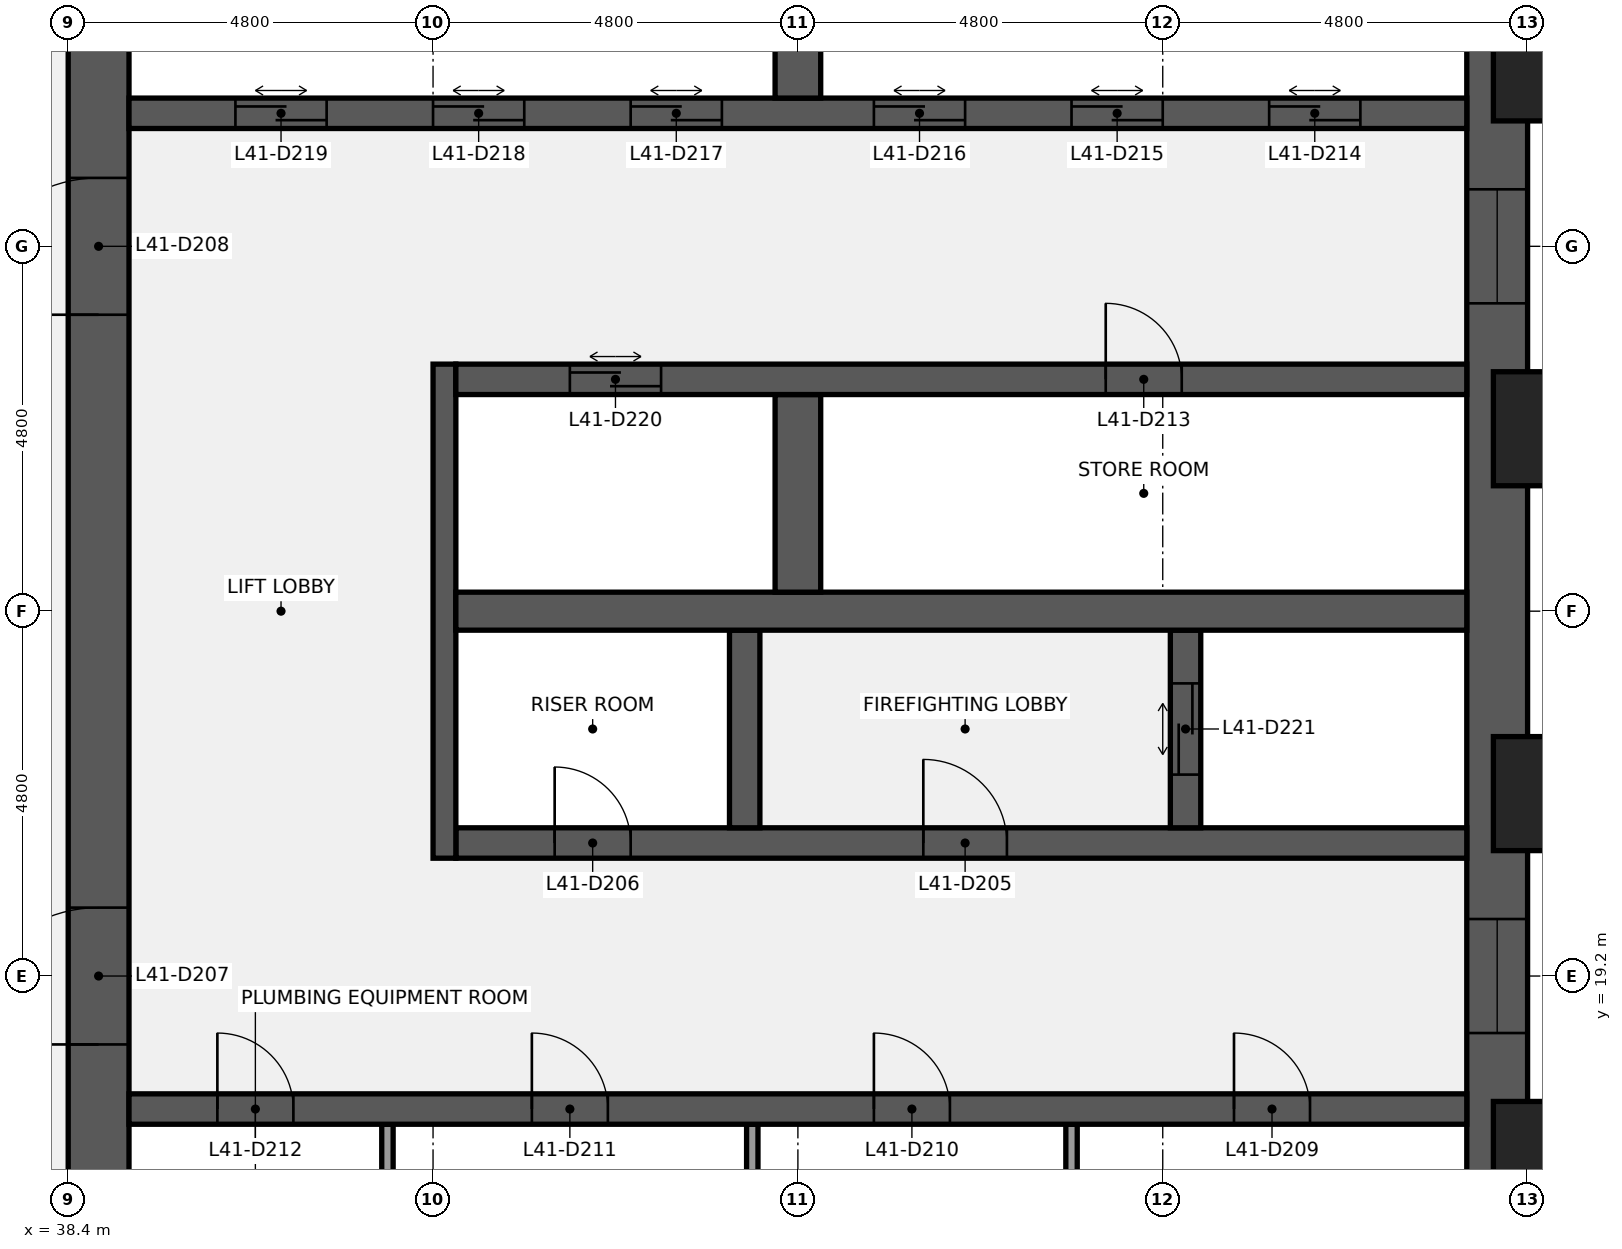
"""IFC4 building model, lengths in metres.
Left out: names, types, materials, properties, quantities, classifications, styles, units other than length and angle.
Written with IfcOpenShell. Run it as: python <this file> out.ifc"""

import sys

from ifc_helpers import new_model, si_unit, direction, frame, frame_2d, origin, origin_2d, place, context, subcontext, project, spatial, rectangle, extrude, element, fill, save


model = new_model("IFC4")
c1 = context("Model", 3, precision=1e-05, world=origin(), true_north=direction((0.0, 1.0)))
c2 = subcontext(c1, "Body", "Model", "MODEL_VIEW")
j1 = project(units=[si_unit("LENGTHUNIT", "METRE"), si_unit("PLANEANGLEUNIT", "RADIAN")], contexts=[c1])
p1 = place(None, origin())
s1 = spatial("IfcSite", under=j1, at=p1, CompositionType="ELEMENT")
p2 = place(p1, origin())
s2 = spatial("IfcBuilding", under=s1, at=p2, CompositionType="ELEMENT")
p3 = place(p2, frame((0.0, 0.0, 193.2)))
s3 = spatial("IfcBuildingStorey", under=s2, at=p3, CompositionType="ELEMENT", Elevation=193.2)
p4 = place(p3, frame((57.2, 38.4, 0.0), z_axis=(0.0, 0.0, 1.0), x_axis=(0.0, -1.0, 0.0)))
e1 = element("IfcWall", 1, at=p4, inside=s3, PredefinedType="SHEAR", context=c2, shape_type="SweptSolid", body=[
    extrude(rectangle(XDim=28.8, YDim=0.8, at=frame_2d((14.4, 0.0))), origin(), (0.0, 0.0, 1.0), 3.84),
])
p5 = place(p4, frame((18.45, 0.0, 0.9)))
e2 = element("IfcOpeningElement", 2, at=p5, cuts=e1, PredefinedType="OPENING", context=c2, shape_type="SweptSolid", body=[
    extrude(rectangle(XDim=1.5, YDim=1.5, at=frame_2d((0.75, 0.75))), frame((0.0, 0.41, 0.0), z_axis=(0.0, -1.0, 0.0), x_axis=(1.0, 0.0, 0.0)), (0.0, 0.0, 1.0), 0.82),
])
p6 = place(p4, frame((8.85, 0.0, 0.9)))
e3 = element("IfcOpeningElement", 3, at=p6, cuts=e1, PredefinedType="OPENING", context=c2, shape_type="SweptSolid", body=[
    extrude(rectangle(XDim=1.5, YDim=1.5, at=frame_2d((0.75, 0.75))), frame((0.0, 0.41, 0.0), z_axis=(0.0, -1.0, 0.0), x_axis=(1.0, 0.0, 0.0)), (0.0, 0.0, 1.0), 0.82),
])
p7 = place(p3, frame((38.8, 9.6, 0.0), z_axis=(0.0, 0.0, 1.0), x_axis=(0.0, 1.0, 0.0)))
e4 = element("IfcWall", 4, at=p7, inside=s3, PredefinedType="SHEAR", context=c2, shape_type="SweptSolid", body=[
    extrude(rectangle(XDim=28.8, YDim=0.8, at=frame_2d((14.4, 0.0))), origin(), (0.0, 0.0, 1.0), 3.84),
])
p8 = place(p7, frame((8.7, 0.0, 0.0)))
e5 = element("IfcOpeningElement", 5, at=p8, cuts=e4, PredefinedType="OPENING", context=c2, shape_type="SweptSolid", body=[
    extrude(rectangle(XDim=1.8, YDim=2.1, at=frame_2d((0.9, 1.05))), frame((0.0, 0.41, 0.0), z_axis=(0.0, -1.0, 0.0), x_axis=(1.0, 0.0, 0.0)), (0.0, 0.0, 1.0), 0.82),
])
p9 = place(p7, frame((18.3, 0.0, 0.0)))
e6 = element("IfcOpeningElement", 6, at=p9, cuts=e4, PredefinedType="OPENING", context=c2, shape_type="SweptSolid", body=[
    extrude(rectangle(XDim=1.8, YDim=2.1, at=frame_2d((0.9, 1.05))), frame((0.0, 0.41, 0.0), z_axis=(0.0, -1.0, 0.0), x_axis=(1.0, 0.0, 0.0)), (0.0, 0.0, 1.0), 0.82),
])
for number, where, z_axis, x_axis in (
    (7, (51.6, 14.65, 0.0), (0.0, 0.0, 1.0), (0.0, 1.0, 0.0)),
    (8, (47.4, 14.65, 0.0), (0.0, 0.0, 1.0), (0.0, 1.0, 0.0)),
    (9, (42.6, 14.65, 0.0), (0.0, 0.0, 1.0), (0.0, 1.0, 0.0)),
):
    element("IfcWall", number, at=place(p3, frame(where, z_axis=z_axis, x_axis=x_axis)), inside=s3, PredefinedType="PARTITIONING", context=c2, shape_type="SweptSolid", body=[
        extrude(rectangle(XDim=2.6, YDim=0.15, at=frame_2d((1.3, 0.0))), origin(), (0.0, 0.0, 1.0), 3.84),
    ])
p10 = place(p3, frame((39.2, 17.45, 0.0), z_axis=(0.0, 0.0, 1.0), x_axis=(1.0, 0.0, 0.0)))
e10 = element("IfcWall", 10, at=p10, inside=s3, PredefinedType="SHEAR", context=c2, shape_type="SweptSolid", body=[
    extrude(rectangle(XDim=17.6, YDim=0.4, at=frame_2d((8.8, 0.0))), origin(), (0.0, 0.0, 1.0), 3.84),
])
p11 = place(p10, frame((14.538, 0.0, 0.0)))
e11 = element("IfcOpeningElement", 11, at=p11, cuts=e10, PredefinedType="OPENING", context=c2, shape_type="SweptSolid", body=[
    extrude(rectangle(XDim=1.0, YDim=2.1, at=frame_2d((0.5, 1.05))), frame((0.0, 0.21, 0.0), z_axis=(0.0, -1.0, 0.0), x_axis=(1.0, 0.0, 0.0)), (0.0, 0.0, 1.0), 0.42),
])
p12 = place(p10, frame((9.8, 0.0, 0.0)))
e12 = element("IfcOpeningElement", 12, at=p12, cuts=e10, PredefinedType="OPENING", context=c2, shape_type="SweptSolid", body=[
    extrude(rectangle(XDim=1.0, YDim=2.1, at=frame_2d((0.5, 1.05))), frame((0.0, 0.21, 0.0), z_axis=(0.0, -1.0, 0.0), x_axis=(1.0, 0.0, 0.0)), (0.0, 0.0, 1.0), 0.42),
])
p13 = place(p10, frame((5.3, 0.0, 0.0)))
e13 = element("IfcOpeningElement", 13, at=p13, cuts=e10, PredefinedType="OPENING", context=c2, shape_type="SweptSolid", body=[
    extrude(rectangle(XDim=1.0, YDim=2.1, at=frame_2d((0.5, 1.05))), frame((0.0, 0.21, 0.0), z_axis=(0.0, -1.0, 0.0), x_axis=(1.0, 0.0, 0.0)), (0.0, 0.0, 1.0), 0.42),
])
p14 = place(p10, frame((1.163, 0.0, 0.0)))
e14 = element("IfcOpeningElement", 14, at=p14, cuts=e10, PredefinedType="OPENING", context=c2, shape_type="SweptSolid", body=[
    extrude(rectangle(XDim=1.0, YDim=2.1, at=frame_2d((0.5, 1.05))), frame((0.0, 0.21, 0.0), z_axis=(0.0, -1.0, 0.0), x_axis=(1.0, 0.0, 0.0)), (0.0, 0.0, 1.0), 0.42),
])
p15 = place(p3, frame((43.5, 20.95, 0.0), z_axis=(0.0, 0.0, 1.0), x_axis=(1.0, 0.0, 0.0)))
e15 = element("IfcWall", 15, at=p15, inside=s3, PredefinedType="SHEAR", context=c2, shape_type="SweptSolid", body=[
    extrude(rectangle(XDim=13.3, YDim=0.4, at=frame_2d((6.65, 0.0))), origin(), (0.0, 0.0, 1.0), 3.84),
])
p16 = place(p15, frame((6.15, 0.0, 0.0)))
e16 = element("IfcOpeningElement", 16, at=p16, cuts=e15, PredefinedType="OPENING", context=c2, shape_type="SweptSolid", body=[
    extrude(rectangle(XDim=1.1, YDim=2.1, at=frame_2d((0.55, 1.05))), frame((0.0, 0.21, 0.0), z_axis=(0.0, -1.0, 0.0), x_axis=(1.0, 0.0, 0.0)), (0.0, 0.0, 1.0), 0.42),
])
p17 = place(p15, frame((1.3, 0.0, 0.0)))
e17 = element("IfcOpeningElement", 17, at=p17, cuts=e15, PredefinedType="OPENING", context=c2, shape_type="SweptSolid", body=[
    extrude(rectangle(XDim=1.0, YDim=2.1, at=frame_2d((0.5, 1.05))), frame((0.0, 0.21, 0.0), z_axis=(0.0, -1.0, 0.0), x_axis=(1.0, 0.0, 0.0)), (0.0, 0.0, 1.0), 0.42),
])
p18 = place(p3, frame((43.35, 20.75, 0.0), z_axis=(0.0, 0.0, 1.0), x_axis=(0.0, 1.0, 0.0)))
e18 = element("IfcWall", 18, at=p18, inside=s3, PredefinedType="SHEAR", context=c2, shape_type="SweptSolid", body=[
    extrude(rectangle(XDim=6.5, YDim=0.3, at=frame_2d((3.25, 0.0))), origin(), (0.0, 0.0, 1.0), 3.84),
])
p19 = place(p3, frame((53.1, 21.15, 0.0), z_axis=(0.0, 0.0, 1.0), x_axis=(0.0, 1.0, 0.0)))
e19 = element("IfcWall", 19, at=p19, inside=s3, PredefinedType="SHEAR", context=c2, shape_type="SweptSolid", body=[
    extrude(rectangle(XDim=2.6, YDim=0.4, at=frame_2d((1.3, 0.0))), origin(), (0.0, 0.0, 1.0), 3.84),
])
p20 = place(p19, frame((0.7, 0.0, 0.0)))
e20 = element("IfcOpeningElement", 20, at=p20, cuts=e19, PredefinedType="OPENING", context=c2, shape_type="SweptSolid", body=[
    extrude(rectangle(XDim=1.2, YDim=2.1, at=frame_2d((0.6, 1.05))), frame((0.0, 0.21, 0.0), z_axis=(0.0, -1.0, 0.0), x_axis=(1.0, 0.0, 0.0)), (0.0, 0.0, 1.0), 0.42),
])
p21 = place(p3, frame((47.3, 21.15, 0.0), z_axis=(0.0, 0.0, 1.0), x_axis=(0.0, 1.0, 0.0)))
e21 = element("IfcWall", 21, at=p21, inside=s3, PredefinedType="SHEAR", context=c2, shape_type="SweptSolid", body=[
    extrude(rectangle(XDim=2.6, YDim=0.4, at=frame_2d((1.3, 0.0))), origin(), (0.0, 0.0, 1.0), 3.84),
])
p22 = place(p3, frame((43.5, 24.0, 0.0), z_axis=(0.0, 0.0, 1.0), x_axis=(1.0, 0.0, 0.0)))
e22 = element("IfcWall", 22, at=p22, inside=s3, PredefinedType="SHEAR", context=c2, shape_type="SweptSolid", body=[
    extrude(rectangle(XDim=13.3, YDim=0.5, at=frame_2d((6.65, 0.0))), origin(), (0.0, 0.0, 1.0), 3.84),
])
p23 = place(p3, frame((48.0, 24.25, 0.0), z_axis=(0.0, 0.0, 1.0), x_axis=(0.0, 1.0, 0.0)))
e23 = element("IfcWall", 23, at=p23, inside=s3, PredefinedType="SHEAR", context=c2, shape_type="SweptSolid", body=[
    extrude(rectangle(XDim=2.6, YDim=0.6, at=frame_2d((1.3, 0.0))), origin(), (0.0, 0.0, 1.0), 3.84),
])
p24 = place(p3, frame((43.5, 27.05, 0.0), z_axis=(0.0, 0.0, 1.0), x_axis=(1.0, 0.0, 0.0)))
e24 = element("IfcWall", 24, at=p24, inside=s3, PredefinedType="SHEAR", context=c2, shape_type="SweptSolid", body=[
    extrude(rectangle(XDim=13.3, YDim=0.4, at=frame_2d((6.65, 0.0))), origin(), (0.0, 0.0, 1.0), 3.84),
])
p25 = place(p24, frame((8.55, 0.0, 0.0)))
e25 = element("IfcOpeningElement", 25, at=p25, cuts=e24, PredefinedType="OPENING", context=c2, shape_type="SweptSolid", body=[
    extrude(rectangle(XDim=1.0, YDim=2.1, at=frame_2d((0.5, 1.05))), frame((0.0, 0.21, 0.0), z_axis=(0.0, -1.0, 0.0), x_axis=(1.0, 0.0, 0.0)), (0.0, 0.0, 1.0), 0.42),
])
p26 = place(p24, frame((1.5, 0.0, 0.0)))
e26 = element("IfcOpeningElement", 26, at=p26, cuts=e24, PredefinedType="OPENING", context=c2, shape_type="SweptSolid", body=[
    extrude(rectangle(XDim=1.2, YDim=2.1, at=frame_2d((0.6, 1.05))), frame((0.0, 0.21, 0.0), z_axis=(0.0, -1.0, 0.0), x_axis=(1.0, 0.0, 0.0)), (0.0, 0.0, 1.0), 0.42),
])
p27 = place(p3, frame((39.2, 30.55, 0.0), z_axis=(0.0, 0.0, 1.0), x_axis=(1.0, 0.0, 0.0)))
e27 = element("IfcWall", 27, at=p27, inside=s3, PredefinedType="SHEAR", context=c2, shape_type="SweptSolid", body=[
    extrude(rectangle(XDim=17.6, YDim=0.4, at=frame_2d((8.8, 0.0))), origin(), (0.0, 0.0, 1.0), 3.84),
])
p28 = place(p27, frame((15.0, 0.0, 0.0)))
e28 = element("IfcOpeningElement", 28, at=p28, cuts=e27, PredefinedType="OPENING", context=c2, shape_type="SweptSolid", body=[
    extrude(rectangle(XDim=1.2, YDim=2.1, at=frame_2d((0.6, 1.05))), frame((0.0, 0.21, 0.0), z_axis=(0.0, -1.0, 0.0), x_axis=(1.0, 0.0, 0.0)), (0.0, 0.0, 1.0), 0.42),
])
p29 = place(p27, frame((12.4, 0.0, 0.0)))
e29 = element("IfcOpeningElement", 29, at=p29, cuts=e27, PredefinedType="OPENING", context=c2, shape_type="SweptSolid", body=[
    extrude(rectangle(XDim=1.2, YDim=2.1, at=frame_2d((0.6, 1.05))), frame((0.0, 0.21, 0.0), z_axis=(0.0, -1.0, 0.0), x_axis=(1.0, 0.0, 0.0)), (0.0, 0.0, 1.0), 0.42),
])
p30 = place(p27, frame((9.8, 0.0, 0.0)))
e30 = element("IfcOpeningElement", 30, at=p30, cuts=e27, PredefinedType="OPENING", context=c2, shape_type="SweptSolid", body=[
    extrude(rectangle(XDim=1.2, YDim=2.1, at=frame_2d((0.6, 1.05))), frame((0.0, 0.21, 0.0), z_axis=(0.0, -1.0, 0.0), x_axis=(1.0, 0.0, 0.0)), (0.0, 0.0, 1.0), 0.42),
])
p31 = place(p27, frame((6.6, 0.0, 0.0)))
e31 = element("IfcOpeningElement", 31, at=p31, cuts=e27, PredefinedType="OPENING", context=c2, shape_type="SweptSolid", body=[
    extrude(rectangle(XDim=1.2, YDim=2.1, at=frame_2d((0.6, 1.05))), frame((0.0, 0.21, 0.0), z_axis=(0.0, -1.0, 0.0), x_axis=(1.0, 0.0, 0.0)), (0.0, 0.0, 1.0), 0.42),
])
p32 = place(p27, frame((4.0, 0.0, 0.0)))
e32 = element("IfcOpeningElement", 32, at=p32, cuts=e27, PredefinedType="OPENING", context=c2, shape_type="SweptSolid", body=[
    extrude(rectangle(XDim=1.2, YDim=2.1, at=frame_2d((0.6, 1.05))), frame((0.0, 0.21, 0.0), z_axis=(0.0, -1.0, 0.0), x_axis=(1.0, 0.0, 0.0)), (0.0, 0.0, 1.0), 0.42),
])
p33 = place(p27, frame((1.4, 0.0, 0.0)))
e33 = element("IfcOpeningElement", 33, at=p33, cuts=e27, PredefinedType="OPENING", context=c2, shape_type="SweptSolid", body=[
    extrude(rectangle(XDim=1.2, YDim=2.1, at=frame_2d((0.6, 1.05))), frame((0.0, 0.21, 0.0), z_axis=(0.0, -1.0, 0.0), x_axis=(1.0, 0.0, 0.0)), (0.0, 0.0, 1.0), 0.42),
])
p34 = place(p3, frame((48.0, 30.75, 0.0), z_axis=(0.0, 0.0, 1.0), x_axis=(0.0, 1.0, 0.0)))
e34 = element("IfcWall", 34, at=p34, inside=s3, PredefinedType="SHEAR", context=c2, shape_type="SweptSolid", body=[
    extrude(rectangle(XDim=2.6, YDim=0.6, at=frame_2d((1.3, 0.0))), origin(), (0.0, 0.0, 1.0), 3.84),
])
for number, where, z_axis, x_axis in (
    (35, (58.35, 16.8, 0.0), (0.0, 0.0, 1.0), (0.0, 1.0, 0.0)),
    (36, (58.35, 21.6, 0.0), (0.0, 0.0, 1.0), (0.0, 1.0, 0.0)),
    (37, (58.35, 26.4, 0.0), (0.0, 0.0, 1.0), (0.0, 1.0, 0.0)),
    (38, (58.35, 31.2, 0.0), (0.0, 0.0, 1.0), (0.0, 1.0, 0.0)),
):
    element("IfcColumn", number, at=place(p3, frame(where, z_axis=z_axis, x_axis=x_axis)), inside=s3, PredefinedType="PILASTER", context=c2, shape_type="SweptSolid", body=[
        extrude(rectangle(XDim=2.4, YDim=1.5, at=origin_2d()), origin(), (0.0, 0.0, 1.0), 4.0),
    ])
p35 = place(p16, origin())
e39 = element("IfcDoor", 39, at=p35, inside=s3, OperationType="SINGLE_SWING_LEFT", PredefinedType="DOOR", context=c2, shape_type="SweptSolid", body=[
    extrude(rectangle(XDim=1.1, YDim=2.1, at=frame_2d((0.55, 1.05))), frame((0.0, 0.025, 0.0), z_axis=(0.0, -1.0, 0.0), x_axis=(1.0, 0.0, 0.0)), (0.0, 0.0, 1.0), 0.05),
])
fill(e16, e39)
p36 = place(p17, origin())
e40 = element("IfcDoor", 40, at=p36, inside=s3, OperationType="SINGLE_SWING_LEFT", PredefinedType="DOOR", context=c2, shape_type="SweptSolid", body=[
    extrude(rectangle(XDim=1.0, YDim=2.1, at=frame_2d((0.5, 1.05))), frame((0.0, 0.025, 0.0), z_axis=(0.0, -1.0, 0.0), x_axis=(1.0, 0.0, 0.0)), (0.0, 0.0, 1.0), 0.05),
])
fill(e17, e40)
p37 = place(p8, origin())
e41 = element("IfcDoor", 41, at=p37, inside=s3, OperationType="DOUBLE_DOOR_SINGLE_SWING", PredefinedType="DOOR", context=c2, shape_type="SweptSolid", body=[
    extrude(rectangle(XDim=1.8, YDim=2.1, at=frame_2d((0.9, 1.05))), frame((0.0, 0.025, 0.0), z_axis=(0.0, -1.0, 0.0), x_axis=(1.0, 0.0, 0.0)), (0.0, 0.0, 1.0), 0.05),
])
fill(e5, e41)
p38 = place(p9, origin())
e42 = element("IfcDoor", 42, at=p38, inside=s3, OperationType="DOUBLE_DOOR_SINGLE_SWING", PredefinedType="DOOR", context=c2, shape_type="SweptSolid", body=[
    extrude(rectangle(XDim=1.8, YDim=2.1, at=frame_2d((0.9, 1.05))), frame((0.0, 0.025, 0.0), z_axis=(0.0, -1.0, 0.0), x_axis=(1.0, 0.0, 0.0)), (0.0, 0.0, 1.0), 0.05),
])
fill(e6, e42)
p39 = place(p11, origin())
e43 = element("IfcDoor", 43, at=p39, inside=s3, OperationType="SINGLE_SWING_LEFT", PredefinedType="DOOR", context=c2, shape_type="SweptSolid", body=[
    extrude(rectangle(XDim=1.0, YDim=2.1, at=frame_2d((0.5, 1.05))), frame((0.0, 0.025, 0.0), z_axis=(0.0, -1.0, 0.0), x_axis=(1.0, 0.0, 0.0)), (0.0, 0.0, 1.0), 0.05),
])
fill(e11, e43)
p40 = place(p12, origin())
e44 = element("IfcDoor", 44, at=p40, inside=s3, OperationType="SINGLE_SWING_LEFT", PredefinedType="DOOR", context=c2, shape_type="SweptSolid", body=[
    extrude(rectangle(XDim=1.0, YDim=2.1, at=frame_2d((0.5, 1.05))), frame((0.0, 0.025, 0.0), z_axis=(0.0, -1.0, 0.0), x_axis=(1.0, 0.0, 0.0)), (0.0, 0.0, 1.0), 0.05),
])
fill(e12, e44)
p41 = place(p13, origin())
e45 = element("IfcDoor", 45, at=p41, inside=s3, OperationType="SINGLE_SWING_LEFT", PredefinedType="DOOR", context=c2, shape_type="SweptSolid", body=[
    extrude(rectangle(XDim=1.0, YDim=2.1, at=frame_2d((0.5, 1.05))), frame((0.0, 0.025, 0.0), z_axis=(0.0, -1.0, 0.0), x_axis=(1.0, 0.0, 0.0)), (0.0, 0.0, 1.0), 0.05),
])
fill(e13, e45)
p42 = place(p14, origin())
e46 = element("IfcDoor", 46, at=p42, inside=s3, OperationType="SINGLE_SWING_LEFT", PredefinedType="DOOR", context=c2, shape_type="SweptSolid", body=[
    extrude(rectangle(XDim=1.0, YDim=2.1, at=frame_2d((0.5, 1.05))), frame((0.0, 0.025, 0.0), z_axis=(0.0, -1.0, 0.0), x_axis=(1.0, 0.0, 0.0)), (0.0, 0.0, 1.0), 0.05),
])
fill(e14, e46)
p43 = place(p25, origin())
e47 = element("IfcDoor", 47, at=p43, inside=s3, OperationType="SINGLE_SWING_LEFT", PredefinedType="DOOR", context=c2, shape_type="SweptSolid", body=[
    extrude(rectangle(XDim=1.0, YDim=2.1, at=frame_2d((0.5, 1.05))), frame((0.0, 0.025, 0.0), z_axis=(0.0, -1.0, 0.0), x_axis=(1.0, 0.0, 0.0)), (0.0, 0.0, 1.0), 0.05),
])
fill(e25, e47)
p44 = place(p28, origin())
e48 = element("IfcDoor", 48, at=p44, inside=s3, OperationType="DOUBLE_DOOR_SLIDING", PredefinedType="DOOR", context=c2, shape_type="SweptSolid", body=[
    extrude(rectangle(XDim=1.2, YDim=2.1, at=frame_2d((0.6, 1.05))), frame((0.0, 0.025, 0.0), z_axis=(0.0, -1.0, 0.0), x_axis=(1.0, 0.0, 0.0)), (0.0, 0.0, 1.0), 0.05),
])
fill(e28, e48)
p45 = place(p29, origin())
e49 = element("IfcDoor", 49, at=p45, inside=s3, OperationType="DOUBLE_DOOR_SLIDING", PredefinedType="DOOR", context=c2, shape_type="SweptSolid", body=[
    extrude(rectangle(XDim=1.2, YDim=2.1, at=frame_2d((0.6, 1.05))), frame((0.0, 0.025, 0.0), z_axis=(0.0, -1.0, 0.0), x_axis=(1.0, 0.0, 0.0)), (0.0, 0.0, 1.0), 0.05),
])
fill(e29, e49)
p46 = place(p30, origin())
e50 = element("IfcDoor", 50, at=p46, inside=s3, OperationType="DOUBLE_DOOR_SLIDING", PredefinedType="DOOR", context=c2, shape_type="SweptSolid", body=[
    extrude(rectangle(XDim=1.2, YDim=2.1, at=frame_2d((0.6, 1.05))), frame((0.0, 0.025, 0.0), z_axis=(0.0, -1.0, 0.0), x_axis=(1.0, 0.0, 0.0)), (0.0, 0.0, 1.0), 0.05),
])
fill(e30, e50)
p47 = place(p31, origin())
e51 = element("IfcDoor", 51, at=p47, inside=s3, OperationType="DOUBLE_DOOR_SLIDING", PredefinedType="DOOR", context=c2, shape_type="SweptSolid", body=[
    extrude(rectangle(XDim=1.2, YDim=2.1, at=frame_2d((0.6, 1.05))), frame((0.0, 0.025, 0.0), z_axis=(0.0, -1.0, 0.0), x_axis=(1.0, 0.0, 0.0)), (0.0, 0.0, 1.0), 0.05),
])
fill(e31, e51)
p48 = place(p32, origin())
e52 = element("IfcDoor", 52, at=p48, inside=s3, OperationType="DOUBLE_DOOR_SLIDING", PredefinedType="DOOR", context=c2, shape_type="SweptSolid", body=[
    extrude(rectangle(XDim=1.2, YDim=2.1, at=frame_2d((0.6, 1.05))), frame((0.0, 0.025, 0.0), z_axis=(0.0, -1.0, 0.0), x_axis=(1.0, 0.0, 0.0)), (0.0, 0.0, 1.0), 0.05),
])
fill(e32, e52)
p49 = place(p33, origin())
e53 = element("IfcDoor", 53, at=p49, inside=s3, OperationType="DOUBLE_DOOR_SLIDING", PredefinedType="DOOR", context=c2, shape_type="SweptSolid", body=[
    extrude(rectangle(XDim=1.2, YDim=2.1, at=frame_2d((0.6, 1.05))), frame((0.0, 0.025, 0.0), z_axis=(0.0, -1.0, 0.0), x_axis=(1.0, 0.0, 0.0)), (0.0, 0.0, 1.0), 0.05),
])
fill(e33, e53)
p50 = place(p26, origin())
e54 = element("IfcDoor", 54, at=p50, inside=s3, OperationType="DOUBLE_DOOR_SLIDING", PredefinedType="DOOR", context=c2, shape_type="SweptSolid", body=[
    extrude(rectangle(XDim=1.2, YDim=2.1, at=frame_2d((0.6, 1.05))), frame((0.0, 0.025, 0.0), z_axis=(0.0, -1.0, 0.0), x_axis=(1.0, 0.0, 0.0)), (0.0, 0.0, 1.0), 0.05),
])
fill(e26, e54)
p51 = place(p20, origin())
e55 = element("IfcDoor", 55, at=p51, inside=s3, OperationType="DOUBLE_DOOR_SLIDING", PredefinedType="DOOR", context=c2, shape_type="SweptSolid", body=[
    extrude(rectangle(XDim=1.2, YDim=2.1, at=frame_2d((0.6, 1.05))), frame((0.0, 0.025, 0.0), z_axis=(0.0, -1.0, 0.0), x_axis=(1.0, 0.0, 0.0)), (0.0, 0.0, 1.0), 0.05),
])
fill(e20, e55)
p52 = place(p5, origin())
e56 = element("IfcWindow", 56, at=p52, inside=s3, PartitioningType="SINGLE_PANEL", PredefinedType="WINDOW", context=c2, shape_type="SweptSolid", body=[
    extrude(rectangle(XDim=1.5, YDim=1.5, at=frame_2d((0.75, 0.75))), frame((0.0, 0.03, 0.0), z_axis=(0.0, -1.0, 0.0), x_axis=(1.0, 0.0, 0.0)), (0.0, 0.0, 1.0), 0.06),
])
fill(e2, e56)
p53 = place(p6, origin())
e57 = element("IfcWindow", 57, at=p53, inside=s3, PartitioningType="SINGLE_PANEL", PredefinedType="WINDOW", context=c2, shape_type="SweptSolid", body=[
    extrude(rectangle(XDim=1.5, YDim=1.5, at=frame_2d((0.75, 0.75))), frame((0.0, 0.03, 0.0), z_axis=(0.0, -1.0, 0.0), x_axis=(1.0, 0.0, 0.0)), (0.0, 0.0, 1.0), 0.06),
])
fill(e3, e57)
save(model, sys.argv[1])
